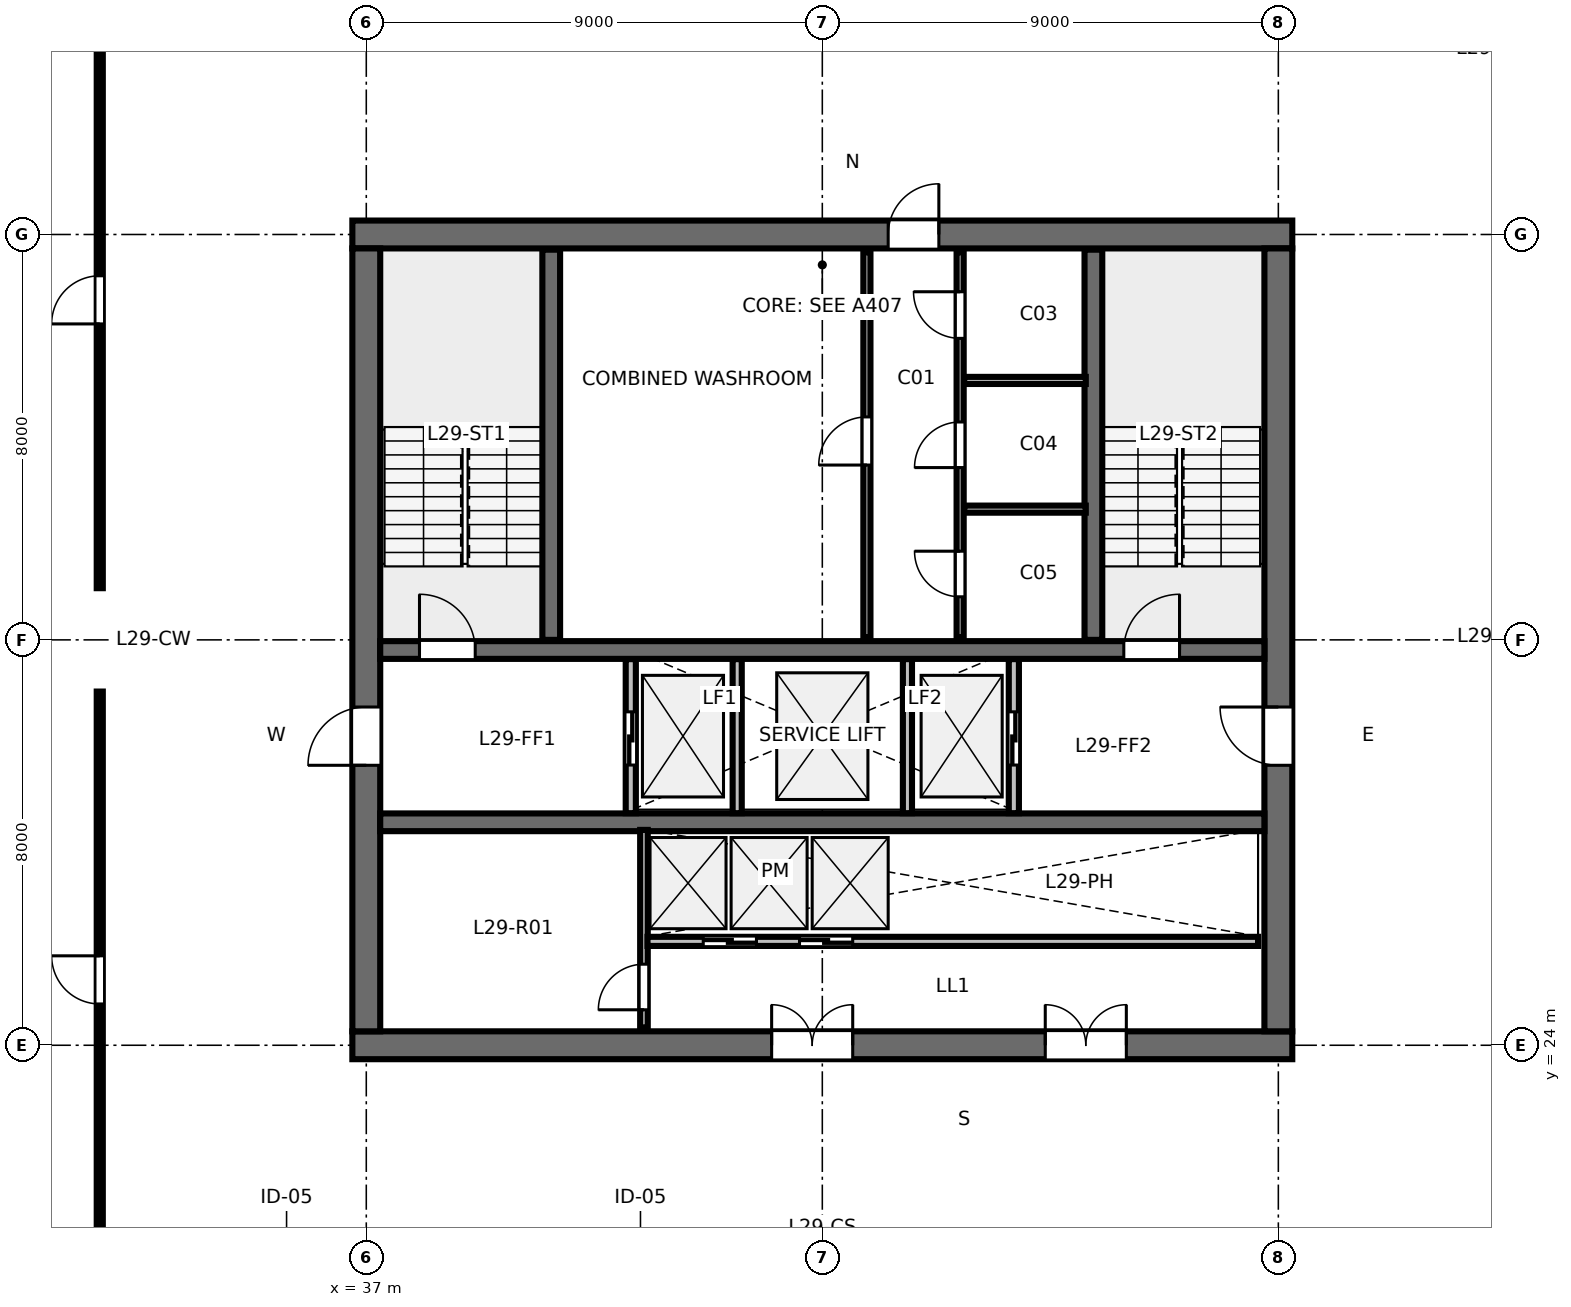
"""IFC4 building model, lengths in metres.
Left out: names, types, materials, properties, quantities, classifications, styles, units other than length and angle.
Written with IfcOpenShell. Run it as: python <this file> out.ifc"""

import sys

from ifc_helpers import new_model, si_unit, direction, frame, frame_2d, origin, place, context, subcontext, project, spatial, rectangle, extrude, element, fill, save


model = new_model("IFC4")
c1 = context("Model", 3, precision=1e-05, world=origin(), true_north=direction((0.0, 1.0)))
c2 = subcontext(c1, "Body", "Model", "MODEL_VIEW")
j1 = project(units=[si_unit("LENGTHUNIT", "METRE"), si_unit("PLANEANGLEUNIT", "RADIAN")], contexts=[c1])
p1 = place(None, origin())
s1 = spatial("IfcSite", under=j1, at=p1, CompositionType="ELEMENT")
p2 = place(p1, origin())
s2 = spatial("IfcBuilding", under=s1, at=p2, CompositionType="ELEMENT")
p3 = place(p2, frame((0.0, 0.0, 113.2)))
s3 = spatial("IfcBuildingStorey", under=s2, at=p3, CompositionType="ELEMENT", Elevation=113.2)
p4 = place(p3, frame((36.725, 24.0, 0.0), z_axis=(0.0, 0.0, 1.0), x_axis=(1.0, 0.0, 0.0)))
e1 = element("IfcWall", 1, at=p4, inside=s3, PredefinedType="SHEAR", context=c2, shape_type="SweptSolid", body=[
    extrude(rectangle(XDim=18.55, YDim=0.55, at=frame_2d((9.275, 0.0))), origin(), (0.0, 0.0, 1.0), 3.36),
])
p5 = place(p4, frame((8.275, 0.0, 0.0)))
e2 = element("IfcOpeningElement", 2, at=p5, cuts=e1, PredefinedType="OPENING", context=c2, shape_type="SweptSolid", body=[
    extrude(rectangle(XDim=1.6, YDim=2.15, at=frame_2d((0.8, 1.075))), frame((0.0, 0.285, 0.0), z_axis=(0.0, -1.0, 0.0), x_axis=(1.0, 0.0, 0.0)), (0.0, 0.0, 1.0), 0.57),
])
p6 = place(p4, frame((13.675, 0.0, 0.0)))
e3 = element("IfcOpeningElement", 3, at=p6, cuts=e1, PredefinedType="OPENING", context=c2, shape_type="SweptSolid", body=[
    extrude(rectangle(XDim=1.6, YDim=2.15, at=frame_2d((0.8, 1.075))), frame((0.0, 0.285, 0.0), z_axis=(0.0, -1.0, 0.0), x_axis=(1.0, 0.0, 0.0)), (0.0, 0.0, 1.0), 0.57),
])
p7 = place(p3, frame((36.725, 40.0, 0.0), z_axis=(0.0, 0.0, 1.0), x_axis=(1.0, 0.0, 0.0)))
e4 = element("IfcWall", 4, at=p7, inside=s3, PredefinedType="SHEAR", context=c2, shape_type="SweptSolid", body=[
    extrude(rectangle(XDim=18.55, YDim=0.55, at=frame_2d((9.275, 0.0))), origin(), (0.0, 0.0, 1.0), 3.36),
])
p8 = place(p7, frame((10.575, 0.0, 0.0)))
e5 = element("IfcOpeningElement", 5, at=p8, cuts=e4, PredefinedType="OPENING", context=c2, shape_type="SweptSolid", body=[
    extrude(rectangle(XDim=1.0, YDim=2.15, at=frame_2d((0.5, 1.075))), frame((0.0, 0.285, 0.0), z_axis=(0.0, -1.0, 0.0), x_axis=(1.0, 0.0, 0.0)), (0.0, 0.0, 1.0), 0.57),
])
p9 = place(p3, frame((37.0, 24.275, 0.0), z_axis=(0.0, 0.0, 1.0), x_axis=(0.0, 1.0, 0.0)))
e6 = element("IfcWall", 6, at=p9, inside=s3, PredefinedType="SHEAR", context=c2, shape_type="SweptSolid", body=[
    extrude(rectangle(XDim=15.45, YDim=0.55, at=frame_2d((7.725, 0.0))), origin(), (0.0, 0.0, 1.0), 3.36),
])
p10 = place(p9, frame((5.25, 0.0, 0.0)))
e7 = element("IfcOpeningElement", 7, at=p10, cuts=e6, PredefinedType="OPENING", context=c2, shape_type="SweptSolid", body=[
    extrude(rectangle(XDim=1.15, YDim=2.15, at=frame_2d((0.575, 1.075))), frame((0.0, 0.285, 0.0), z_axis=(0.0, -1.0, 0.0), x_axis=(1.0, 0.0, 0.0)), (0.0, 0.0, 1.0), 0.57),
])
p11 = place(p3, frame((55.0, 24.275, 0.0), z_axis=(0.0, 0.0, 1.0), x_axis=(0.0, 1.0, 0.0)))
e8 = element("IfcWall", 8, at=p11, inside=s3, PredefinedType="SHEAR", context=c2, shape_type="SweptSolid", body=[
    extrude(rectangle(XDim=15.45, YDim=0.55, at=frame_2d((7.725, 0.0))), origin(), (0.0, 0.0, 1.0), 3.36),
])
p12 = place(p11, frame((5.25, 0.0, 0.0)))
e9 = element("IfcOpeningElement", 9, at=p12, cuts=e8, PredefinedType="OPENING", context=c2, shape_type="SweptSolid", body=[
    extrude(rectangle(XDim=1.15, YDim=2.15, at=frame_2d((0.575, 1.075))), frame((0.0, 0.285, 0.0), z_axis=(0.0, -1.0, 0.0), x_axis=(1.0, 0.0, 0.0)), (0.0, 0.0, 1.0), 0.57),
])
p13 = place(p3, frame((37.275, 31.8, 0.0), z_axis=(0.0, 0.0, 1.0), x_axis=(1.0, 0.0, 0.0)))
e10 = element("IfcWall", 10, at=p13, inside=s3, PredefinedType="SHEAR", context=c2, shape_type="SweptSolid", body=[
    extrude(rectangle(XDim=17.45, YDim=0.35, at=frame_2d((8.725, 0.0))), origin(), (0.0, 0.0, 1.0), 3.36),
])
p14 = place(p13, frame((0.775, 0.0, 0.0)))
e11 = element("IfcOpeningElement", 11, at=p14, cuts=e10, PredefinedType="OPENING", context=c2, shape_type="SweptSolid", body=[
    extrude(rectangle(XDim=1.1, YDim=2.15, at=frame_2d((0.55, 1.075))), frame((0.0, 0.185, 0.0), z_axis=(0.0, -1.0, 0.0), x_axis=(1.0, 0.0, 0.0)), (0.0, 0.0, 1.0), 0.37),
])
p15 = place(p13, frame((14.675, 0.0, 0.0)))
e12 = element("IfcOpeningElement", 12, at=p15, cuts=e10, PredefinedType="OPENING", context=c2, shape_type="SweptSolid", body=[
    extrude(rectangle(XDim=1.1, YDim=2.15, at=frame_2d((0.55, 1.075))), frame((0.0, 0.185, 0.0), z_axis=(0.0, -1.0, 0.0), x_axis=(1.0, 0.0, 0.0)), (0.0, 0.0, 1.0), 0.37),
])
p16 = place(p3, frame((37.275, 28.4, 0.0), z_axis=(0.0, 0.0, 1.0), x_axis=(1.0, 0.0, 0.0)))
e13 = element("IfcWall", 13, at=p16, inside=s3, PredefinedType="SHEAR", context=c2, shape_type="SweptSolid", body=[
    extrude(rectangle(XDim=17.45, YDim=0.35, at=frame_2d((8.725, 0.0))), origin(), (0.0, 0.0, 1.0), 3.36),
])
for number, where, z_axis, x_axis in (
    (14, (40.65, 32.0, 0.0), (0.0, 0.0, 1.0), (0.0, 1.0, 0.0)),
    (15, (51.35, 32.0, 0.0), (0.0, 0.0, 1.0), (0.0, 1.0, 0.0)),
):
    element("IfcWall", number, at=place(p3, frame(where, z_axis=z_axis, x_axis=x_axis)), inside=s3, PredefinedType="SHEAR", context=c2, shape_type="SweptSolid", body=[
        extrude(rectangle(XDim=7.7, YDim=0.35, at=frame_2d((3.85, 0.0))), origin(), (0.0, 0.0, 1.0), 3.6),
    ])
p17 = place(p3, frame((46.88, 32.05, 0.0), z_axis=(0.0, 0.0, 1.0), x_axis=(0.0, 1.0, 0.0)))
e16 = element("IfcWall", 16, at=p17, inside=s3, PredefinedType="PARTITIONING", context=c2, shape_type="SweptSolid", body=[
    extrude(rectangle(XDim=7.6, YDim=0.14, at=frame_2d((3.8, 0.0))), origin(), (0.0, 0.0, 1.0), 3.36),
])
p18 = place(p17, frame((3.4, 0.0, 0.0)))
e17 = element("IfcOpeningElement", 17, at=p18, cuts=e16, PredefinedType="OPENING", context=c2, shape_type="SweptSolid", body=[
    extrude(rectangle(XDim=0.95, YDim=2.15, at=frame_2d((0.475, 1.075))), frame((0.0, 0.08, 0.0), z_axis=(0.0, -1.0, 0.0), x_axis=(1.0, 0.0, 0.0)), (0.0, 0.0, 1.0), 0.16),
])
p19 = place(p3, frame((48.72, 32.05, 0.0), z_axis=(0.0, 0.0, 1.0), x_axis=(0.0, 1.0, 0.0)))
e18 = element("IfcWall", 18, at=p19, inside=s3, PredefinedType="PARTITIONING", context=c2, shape_type="SweptSolid", body=[
    extrude(rectangle(XDim=7.6, YDim=0.14, at=frame_2d((3.8, 0.0))), origin(), (0.0, 0.0, 1.0), 3.36),
])
p20 = place(p19, frame((0.8, 0.0, 0.0)))
e19 = element("IfcOpeningElement", 19, at=p20, cuts=e18, PredefinedType="OPENING", context=c2, shape_type="SweptSolid", body=[
    extrude(rectangle(XDim=0.9, YDim=2.15, at=frame_2d((0.45, 1.075))), frame((0.0, 0.08, 0.0), z_axis=(0.0, -1.0, 0.0), x_axis=(1.0, 0.0, 0.0)), (0.0, 0.0, 1.0), 0.16),
])
p21 = place(p19, frame((3.35, 0.0, 0.0)))
e20 = element("IfcOpeningElement", 20, at=p21, cuts=e18, PredefinedType="OPENING", context=c2, shape_type="SweptSolid", body=[
    extrude(rectangle(XDim=0.9, YDim=2.15, at=frame_2d((0.45, 1.075))), frame((0.0, 0.08, 0.0), z_axis=(0.0, -1.0, 0.0), x_axis=(1.0, 0.0, 0.0)), (0.0, 0.0, 1.0), 0.16),
])
p22 = place(p19, frame((5.9, 0.0, 0.0)))
e21 = element("IfcOpeningElement", 21, at=p22, cuts=e18, PredefinedType="OPENING", context=c2, shape_type="SweptSolid", body=[
    extrude(rectangle(XDim=0.92, YDim=2.15, at=frame_2d((0.46, 1.075))), frame((0.0, 0.08, 0.0), z_axis=(0.0, -1.0, 0.0), x_axis=(1.0, 0.0, 0.0)), (0.0, 0.0, 1.0), 0.16),
])
for number, where, z_axis, x_axis in (
    (22, (48.8, 34.58, 0.0), (0.0, 0.0, 1.0), (1.0, 0.0, 0.0)),
    (23, (48.8, 37.12, 0.0), (0.0, 0.0, 1.0), (1.0, 0.0, 0.0)),
):
    element("IfcWall", number, at=place(p3, frame(where, z_axis=z_axis, x_axis=x_axis)), inside=s3, PredefinedType="PARTITIONING", context=c2, shape_type="SweptSolid", body=[
        extrude(rectangle(XDim=2.4, YDim=0.14, at=frame_2d((1.2, 0.0))), origin(), (0.0, 0.0, 1.0), 3.36),
    ])
p23 = place(p3, frame((42.22, 28.58, 0.0), z_axis=(0.0, 0.0, 1.0), x_axis=(0.0, 1.0, 0.0)))
e24 = element("IfcWall", 24, at=p23, inside=s3, PredefinedType="PARTITIONING", context=c2, shape_type="SweptSolid", body=[
    extrude(rectangle(XDim=3.04, YDim=0.2, at=frame_2d((1.52, 0.0))), origin(), (0.0, 0.0, 1.0), 3.36),
])
p24 = place(p23, frame((0.95, 0.0, 0.0)))
e25 = element("IfcOpeningElement", 25, at=p24, cuts=e24, PredefinedType="OPENING", context=c2, shape_type="SweptSolid", body=[
    extrude(rectangle(XDim=1.05, YDim=2.15, at=frame_2d((0.525, 1.075))), frame((0.0, 0.11, 0.0), z_axis=(0.0, -1.0, 0.0), x_axis=(1.0, 0.0, 0.0)), (0.0, 0.0, 1.0), 0.22),
])
p25 = place(p3, frame((49.78, 28.58, 0.0), z_axis=(0.0, 0.0, 1.0), x_axis=(0.0, 1.0, 0.0)))
e26 = element("IfcWall", 26, at=p25, inside=s3, PredefinedType="PARTITIONING", context=c2, shape_type="SweptSolid", body=[
    extrude(rectangle(XDim=3.04, YDim=0.2, at=frame_2d((1.52, 0.0))), origin(), (0.0, 0.0, 1.0), 3.36),
])
p26 = place(p25, frame((0.95, 0.0, 0.0)))
e27 = element("IfcOpeningElement", 27, at=p26, cuts=e26, PredefinedType="OPENING", context=c2, shape_type="SweptSolid", body=[
    extrude(rectangle(XDim=1.05, YDim=2.15, at=frame_2d((0.525, 1.075))), frame((0.0, 0.11, 0.0), z_axis=(0.0, -1.0, 0.0), x_axis=(1.0, 0.0, 0.0)), (0.0, 0.0, 1.0), 0.22),
])
for number, where, z_axis, x_axis in (
    (28, (44.32, 28.58, 0.0), (0.0, 0.0, 1.0), (0.0, 1.0, 0.0)),
    (29, (47.68, 28.58, 0.0), (0.0, 0.0, 1.0), (0.0, 1.0, 0.0)),
):
    element("IfcWall", number, at=place(p3, frame(where, z_axis=z_axis, x_axis=x_axis)), inside=s3, PredefinedType="PARTITIONING", context=c2, shape_type="SweptSolid", body=[
        extrude(rectangle(XDim=3.04, YDim=0.18, at=frame_2d((1.52, 0.0))), origin(), (0.0, 0.0, 1.0), 3.36),
    ])
p27 = place(p3, frame((42.48, 24.35, 0.0), z_axis=(0.0, 0.0, 1.0), x_axis=(0.0, 1.0, 0.0)))
e30 = element("IfcWall", 30, at=p27, inside=s3, PredefinedType="PARTITIONING", context=c2, shape_type="SweptSolid", body=[
    extrude(rectangle(XDim=3.9, YDim=0.15, at=frame_2d((1.95, 0.0))), origin(), (0.0, 0.0, 1.0), 3.36),
])
p28 = place(p27, frame((0.35, 0.0, 0.0)))
e31 = element("IfcOpeningElement", 31, at=p28, cuts=e30, PredefinedType="OPENING", context=c2, shape_type="SweptSolid", body=[
    extrude(rectangle(XDim=0.9, YDim=2.15, at=frame_2d((0.45, 1.075))), frame((0.0, 0.085, 0.0), z_axis=(0.0, -1.0, 0.0), x_axis=(1.0, 0.0, 0.0)), (0.0, 0.0, 1.0), 0.17),
])
p29 = place(p3, frame((42.55, 26.05, 0.0), z_axis=(0.0, 0.0, 1.0), x_axis=(1.0, 0.0, 0.0)))
e32 = element("IfcWall", 32, at=p29, inside=s3, PredefinedType="PARTITIONING", context=c2, shape_type="SweptSolid", body=[
    extrude(rectangle(XDim=12.05, YDim=0.18, at=frame_2d((6.025, 0.0))), origin(), (0.0, 0.0, 1.0), 3.36),
])
p30 = place(p29, frame((1.1, 0.0, 0.0)))
e33 = element("IfcOpeningElement", 33, at=p30, cuts=e32, PredefinedType="OPENING", context=c2, shape_type="SweptSolid", body=[
    extrude(rectangle(XDim=1.05, YDim=2.15, at=frame_2d((0.525, 1.075))), frame((0.0, 0.1, 0.0), z_axis=(0.0, -1.0, 0.0), x_axis=(1.0, 0.0, 0.0)), (0.0, 0.0, 1.0), 0.2),
])
p31 = place(p29, frame((3.0, 0.0, 0.0)))
e34 = element("IfcOpeningElement", 34, at=p31, cuts=e32, PredefinedType="OPENING", context=c2, shape_type="SweptSolid", body=[
    extrude(rectangle(XDim=1.05, YDim=2.15, at=frame_2d((0.525, 1.075))), frame((0.0, 0.1, 0.0), z_axis=(0.0, -1.0, 0.0), x_axis=(1.0, 0.0, 0.0)), (0.0, 0.0, 1.0), 0.2),
])
p32 = place(p3, frame((31.74, 19.4, 0.0), z_axis=(0.0, 0.0, 1.0), x_axis=(0.0, 1.0, 0.0)))
e35 = element("IfcWall", 35, at=p32, inside=s3, PredefinedType="PARTITIONING", context=c2, shape_type="SweptSolid", body=[
    extrude(rectangle(XDim=11.58, YDim=0.12, at=frame_2d((5.79, 0.0))), origin(), (0.0, 0.0, 1.0), 2.64),
])
p33 = place(p32, frame((5.415, 0.0, 0.0)))
e36 = element("IfcOpeningElement", 36, at=p33, cuts=e35, PredefinedType="OPENING", context=c2, shape_type="SweptSolid", body=[
    extrude(rectangle(XDim=0.95, YDim=2.15, at=frame_2d((0.475, 1.075))), frame((0.0, 0.07, 0.0), z_axis=(0.0, -1.0, 0.0), x_axis=(1.0, 0.0, 0.0)), (0.0, 0.0, 1.0), 0.14),
])
p34 = place(p3, frame((31.74, 33.02, 0.0), z_axis=(0.0, 0.0, 1.0), x_axis=(0.0, 1.0, 0.0)))
e37 = element("IfcWall", 37, at=p34, inside=s3, PredefinedType="PARTITIONING", context=c2, shape_type="SweptSolid", body=[
    extrude(rectangle(XDim=11.58, YDim=0.12, at=frame_2d((5.79, 0.0))), origin(), (0.0, 0.0, 1.0), 2.64),
])
p35 = place(p34, frame((5.215, 0.0, 0.0)))
e38 = element("IfcOpeningElement", 38, at=p35, cuts=e37, PredefinedType="OPENING", context=c2, shape_type="SweptSolid", body=[
    extrude(rectangle(XDim=0.95, YDim=2.15, at=frame_2d((0.475, 1.075))), frame((0.0, 0.07, 0.0), z_axis=(0.0, -1.0, 0.0), x_axis=(1.0, 0.0, 0.0)), (0.0, 0.0, 1.0), 0.14),
])
p36 = place(p14, origin())
e39 = element("IfcDoor", 39, at=p36, inside=s3, OperationType="SINGLE_SWING_LEFT", PredefinedType="DOOR", context=c2, shape_type="SweptSolid", body=[
    extrude(rectangle(XDim=1.1, YDim=2.15, at=frame_2d((0.55, 1.075))), frame((0.0, 0.025, 0.0), z_axis=(0.0, -1.0, 0.0), x_axis=(1.0, 0.0, 0.0)), (0.0, 0.0, 1.0), 0.05),
])
fill(e11, e39)
p37 = place(p15, origin())
e40 = element("IfcDoor", 40, at=p37, inside=s3, OperationType="SINGLE_SWING_RIGHT", PredefinedType="DOOR", context=c2, shape_type="SweptSolid", body=[
    extrude(rectangle(XDim=1.1, YDim=2.15, at=frame_2d((0.55, 1.075))), frame((0.0, 0.025, 0.0), z_axis=(0.0, -1.0, 0.0), x_axis=(1.0, 0.0, 0.0)), (0.0, 0.0, 1.0), 0.05),
])
fill(e12, e40)
p38 = place(p8, origin())
e41 = element("IfcDoor", 41, at=p38, inside=s3, OperationType="SINGLE_SWING_RIGHT", PredefinedType="DOOR", context=c2, shape_type="SweptSolid", body=[
    extrude(rectangle(XDim=1.0, YDim=2.15, at=frame_2d((0.5, 1.075))), frame((0.0, 0.025, 0.0), z_axis=(0.0, -1.0, 0.0), x_axis=(1.0, 0.0, 0.0)), (0.0, 0.0, 1.0), 0.05),
])
fill(e5, e41)
p39 = place(p10, origin())
e42 = element("IfcDoor", 42, at=p39, inside=s3, OperationType="SINGLE_SWING_LEFT", PredefinedType="DOOR", context=c2, shape_type="SweptSolid", body=[
    extrude(rectangle(XDim=1.15, YDim=2.15, at=frame_2d((0.575, 1.075))), frame((0.0, 0.025, 0.0), z_axis=(0.0, -1.0, 0.0), x_axis=(1.0, 0.0, 0.0)), (0.0, 0.0, 1.0), 0.05),
])
fill(e7, e42)
p40 = place(p12, origin())
e43 = element("IfcDoor", 43, at=p40, inside=s3, OperationType="SINGLE_SWING_RIGHT", PredefinedType="DOOR", context=c2, shape_type="SweptSolid", body=[
    extrude(rectangle(XDim=1.15, YDim=2.15, at=frame_2d((0.575, 1.075))), frame((0.0, 0.025, 0.0), z_axis=(0.0, -1.0, 0.0), x_axis=(1.0, 0.0, 0.0)), (0.0, 0.0, 1.0), 0.05),
])
fill(e9, e43)
p41 = place(p5, origin())
e44 = element("IfcDoor", 44, at=p41, inside=s3, OperationType="DOUBLE_DOOR_SINGLE_SWING", PredefinedType="DOOR", context=c2, shape_type="SweptSolid", body=[
    extrude(rectangle(XDim=1.6, YDim=2.15, at=frame_2d((0.8, 1.075))), frame((0.0, 0.025, 0.0), z_axis=(0.0, -1.0, 0.0), x_axis=(1.0, 0.0, 0.0)), (0.0, 0.0, 1.0), 0.05),
])
fill(e2, e44)
p42 = place(p6, origin())
e45 = element("IfcDoor", 45, at=p42, inside=s3, OperationType="DOUBLE_DOOR_SINGLE_SWING", PredefinedType="DOOR", context=c2, shape_type="SweptSolid", body=[
    extrude(rectangle(XDim=1.6, YDim=2.15, at=frame_2d((0.8, 1.075))), frame((0.0, 0.025, 0.0), z_axis=(0.0, -1.0, 0.0), x_axis=(1.0, 0.0, 0.0)), (0.0, 0.0, 1.0), 0.05),
])
fill(e3, e45)
p43 = place(p18, origin())
e46 = element("IfcDoor", 46, at=p43, inside=s3, OperationType="SINGLE_SWING_LEFT", PredefinedType="DOOR", context=c2, shape_type="SweptSolid", body=[
    extrude(rectangle(XDim=0.95, YDim=2.15, at=frame_2d((0.475, 1.075))), frame((0.0, 0.025, 0.0), z_axis=(0.0, -1.0, 0.0), x_axis=(1.0, 0.0, 0.0)), (0.0, 0.0, 1.0), 0.05),
])
fill(e17, e46)
p44 = place(p20, origin())
e47 = element("IfcDoor", 47, at=p44, inside=s3, OperationType="SINGLE_SWING_RIGHT", PredefinedType="DOOR", context=c2, shape_type="SweptSolid", body=[
    extrude(rectangle(XDim=0.9, YDim=2.15, at=frame_2d((0.45, 1.075))), frame((0.0, 0.025, 0.0), z_axis=(0.0, -1.0, 0.0), x_axis=(1.0, 0.0, 0.0)), (0.0, 0.0, 1.0), 0.05),
])
fill(e19, e47)
p45 = place(p21, origin())
e48 = element("IfcDoor", 48, at=p45, inside=s3, OperationType="SINGLE_SWING_LEFT", PredefinedType="DOOR", context=c2, shape_type="SweptSolid", body=[
    extrude(rectangle(XDim=0.9, YDim=2.15, at=frame_2d((0.45, 1.075))), frame((0.0, 0.025, 0.0), z_axis=(0.0, -1.0, 0.0), x_axis=(1.0, 0.0, 0.0)), (0.0, 0.0, 1.0), 0.05),
])
fill(e20, e48)
p46 = place(p22, origin())
e49 = element("IfcDoor", 49, at=p46, inside=s3, OperationType="SINGLE_SWING_RIGHT", PredefinedType="DOOR", context=c2, shape_type="SweptSolid", body=[
    extrude(rectangle(XDim=0.92, YDim=2.15, at=frame_2d((0.46, 1.075))), frame((0.0, 0.025, 0.0), z_axis=(0.0, -1.0, 0.0), x_axis=(1.0, 0.0, 0.0)), (0.0, 0.0, 1.0), 0.05),
])
fill(e21, e49)
p47 = place(p24, origin())
e50 = element("IfcDoor", 50, at=p47, inside=s3, OperationType="SLIDING_TO_LEFT", PredefinedType="DOOR", context=c2, shape_type="SweptSolid", body=[
    extrude(rectangle(XDim=1.05, YDim=2.15, at=frame_2d((0.525, 1.075))), frame((0.0, 0.025, 0.0), z_axis=(0.0, -1.0, 0.0), x_axis=(1.0, 0.0, 0.0)), (0.0, 0.0, 1.0), 0.05),
])
fill(e25, e50)
p48 = place(p26, origin())
e51 = element("IfcDoor", 51, at=p48, inside=s3, OperationType="SLIDING_TO_RIGHT", PredefinedType="DOOR", context=c2, shape_type="SweptSolid", body=[
    extrude(rectangle(XDim=1.05, YDim=2.15, at=frame_2d((0.525, 1.075))), frame((0.0, 0.025, 0.0), z_axis=(0.0, -1.0, 0.0), x_axis=(1.0, 0.0, 0.0)), (0.0, 0.0, 1.0), 0.05),
])
fill(e27, e51)
p49 = place(p28, origin())
e52 = element("IfcDoor", 52, at=p49, inside=s3, OperationType="SINGLE_SWING_LEFT", PredefinedType="DOOR", context=c2, shape_type="SweptSolid", body=[
    extrude(rectangle(XDim=0.9, YDim=2.15, at=frame_2d((0.45, 1.075))), frame((0.0, 0.025, 0.0), z_axis=(0.0, -1.0, 0.0), x_axis=(1.0, 0.0, 0.0)), (0.0, 0.0, 1.0), 0.05),
])
fill(e31, e52)
p50 = place(p30, origin())
e53 = element("IfcDoor", 53, at=p50, inside=s3, OperationType="SLIDING_TO_LEFT", PredefinedType="DOOR", context=c2, shape_type="SweptSolid", body=[
    extrude(rectangle(XDim=1.05, YDim=2.15, at=frame_2d((0.525, 1.075))), frame((0.0, 0.025, 0.0), z_axis=(0.0, -1.0, 0.0), x_axis=(1.0, 0.0, 0.0)), (0.0, 0.0, 1.0), 0.05),
])
fill(e33, e53)
p51 = place(p31, origin())
e54 = element("IfcDoor", 54, at=p51, inside=s3, OperationType="SLIDING_TO_RIGHT", PredefinedType="DOOR", context=c2, shape_type="SweptSolid", body=[
    extrude(rectangle(XDim=1.05, YDim=2.15, at=frame_2d((0.525, 1.075))), frame((0.0, 0.025, 0.0), z_axis=(0.0, -1.0, 0.0), x_axis=(1.0, 0.0, 0.0)), (0.0, 0.0, 1.0), 0.05),
])
fill(e34, e54)
p52 = place(p33, origin())
e55 = element("IfcDoor", 55, at=p52, inside=s3, OperationType="SINGLE_SWING_RIGHT", PredefinedType="DOOR", context=c2, shape_type="SweptSolid", body=[
    extrude(rectangle(XDim=0.95, YDim=2.15, at=frame_2d((0.475, 1.075))), frame((0.0, 0.025, 0.0), z_axis=(0.0, -1.0, 0.0), x_axis=(1.0, 0.0, 0.0)), (0.0, 0.0, 1.0), 0.05),
])
fill(e36, e55)
p53 = place(p35, origin())
e56 = element("IfcDoor", 56, at=p53, inside=s3, OperationType="SINGLE_SWING_LEFT", PredefinedType="DOOR", context=c2, shape_type="SweptSolid", body=[
    extrude(rectangle(XDim=0.95, YDim=2.15, at=frame_2d((0.475, 1.075))), frame((0.0, 0.025, 0.0), z_axis=(0.0, -1.0, 0.0), x_axis=(1.0, 0.0, 0.0)), (0.0, 0.0, 1.0), 0.05),
])
fill(e38, e56)
save(model, sys.argv[1])
